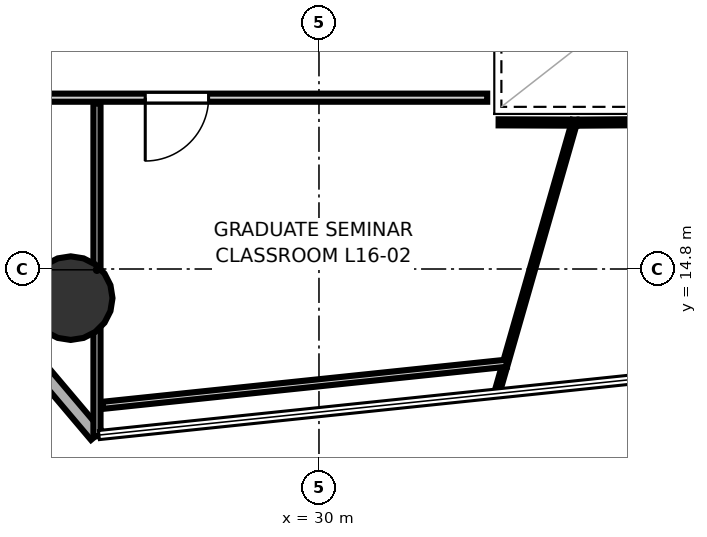
"""IFC4 building model, lengths in metres.
Left out: names, types, materials, properties, quantities, classifications, styles, units other than length and angle.
Written with IfcOpenShell. Run it as: python <this file> out.ifc"""

import sys

from ifc_helpers import new_model, si_unit, direction, frame, frame_2d, origin, origin_2d, place, context, subcontext, project, spatial, rectangle, hollow_circle, extrude, element, fill, save


model = new_model("IFC4")
c1 = context("Model", 3, precision=1e-05, world=origin(), true_north=direction((0.0, 1.0)))
c2 = subcontext(c1, "Body", "Model", "MODEL_VIEW")
j1 = project(units=[si_unit("LENGTHUNIT", "METRE"), si_unit("PLANEANGLEUNIT", "RADIAN")], contexts=[c1])
p1 = place(None, origin())
s1 = spatial("IfcSite", under=j1, at=p1, CompositionType="ELEMENT")
p2 = place(p1, origin())
s2 = spatial("IfcBuilding", under=s1, at=p2, CompositionType="ELEMENT")
p3 = place(p2, frame((0.0, 0.0, 67.3)))
s3 = spatial("IfcBuildingStorey", under=s2, at=p3, CompositionType="ELEMENT", Elevation=67.3)
p4 = place(p3, frame((25.1, 14.225, 0.0), z_axis=(0.0, 0.0, 1.0), x_axis=(1.0, 0.0, 0.0)))
e1 = element("IfcColumn", 1, at=p4, inside=s3, PredefinedType="COLUMN", context=c2, shape_type="SweptSolid", body=[
    extrude(hollow_circle(Radius=0.825, WallThickness=0.04, at=origin_2d()), origin(), (0.0, 0.0, 1.0), 3.7),
])
p5 = place(p3, frame((17.827, 20.72, 0.0), z_axis=(0.0, 0.0, 1.0), x_axis=(0.645636137958, -0.763645190755, 0.0)))
e2 = element("IfcWall", 2, at=p5, inside=s3, PredefinedType="SOLIDWALL", context=c2, shape_type="SweptSolid", body=[
    extrude(rectangle(XDim=12.051, YDim=0.28, at=frame_2d((6.025, 0.0))), origin(), (0.0, 0.0, 1.0), 3.52),
])
p6 = place(p5, frame((2.715, 0.0, 0.85)))
e3 = element("IfcOpeningElement", 3, at=p6, cuts=e2, PredefinedType="OPENING", context=c2, shape_type="SweptSolid", body=[
    extrude(rectangle(XDim=1.8, YDim=2.1, at=frame_2d((0.9, 1.05))), frame((0.0, 0.15, 0.0), z_axis=(0.0, -1.0, 0.0), x_axis=(1.0, 0.0, 0.0)), (0.0, 0.0, 1.0), 0.3),
])
p7 = place(p5, frame((7.536, 0.0, 0.85)))
e4 = element("IfcOpeningElement", 4, at=p7, cuts=e2, PredefinedType="OPENING", context=c2, shape_type="SweptSolid", body=[
    extrude(rectangle(XDim=1.8, YDim=2.1, at=frame_2d((0.9, 1.05))), frame((0.0, 0.15, 0.0), z_axis=(0.0, -1.0, 0.0), x_axis=(1.0, 0.0, 0.0)), (0.0, 0.0, 1.0), 0.3),
])
p8 = place(p3, frame((33.32, 18.181, 0.0), z_axis=(0.0, 0.0, 1.0), x_axis=(-1.0, 0.0, 0.0)))
e5 = element("IfcWall", 5, at=p8, inside=s3, PredefinedType="PARTITIONING", context=c2, shape_type="SweptSolid", body=[
    extrude(rectangle(XDim=9.77, YDim=0.16, at=frame_2d((4.885, 0.0))), origin(), (0.0, 0.0, 1.0), 2.798),
])
p9 = place(p8, frame((5.499, 0.0, 0.0)))
e6 = element("IfcOpeningElement", 6, at=p9, cuts=e5, PredefinedType="OPENING", context=c2, shape_type="SweptSolid", body=[
    extrude(rectangle(XDim=1.25, YDim=2.2, at=frame_2d((0.625, 1.1))), frame((0.0, 0.09, 0.0), z_axis=(0.0, -1.0, 0.0), x_axis=(1.0, 0.0, 0.0)), (0.0, 0.0, 1.0), 0.18),
])
p10 = place(p3, frame((25.619, 18.07, 0.0), z_axis=(0.0, 0.0, 1.0), x_axis=(0.0, -1.0, 0.0)))
e7 = element("IfcWall", 7, at=p10, inside=s3, PredefinedType="PARTITIONING", context=c2, shape_type="SweptSolid", body=[
    extrude(rectangle(XDim=6.571, YDim=0.14, at=frame_2d((3.286, 0.0))), origin(), (0.0, 0.0, 1.0), 2.798),
])
p11 = place(p3, frame((33.545, 17.694, 0.0), z_axis=(0.0, 0.0, 1.0), x_axis=(0.99999388923, -0.003495926516, 0.0)))
e8 = element("IfcWall", 8, at=p11, inside=s3, PredefinedType="PARTITIONING", context=c2, shape_type="SweptSolid", body=[
    extrude(rectangle(XDim=1.536, YDim=0.12, at=frame_2d((0.768, 0.0))), origin(), (0.0, 0.0, 1.0), 2.84),
])
p12 = place(p3, frame((35.052, 17.729, 0.0), z_axis=(0.0, 0.0, 1.0), x_axis=(-0.275649797441, -0.961258128273, 0.0)))
e9 = element("IfcWall", 9, at=p12, inside=s3, PredefinedType="PARTITIONING", context=c2, shape_type="SweptSolid", body=[
    extrude(rectangle(XDim=5.624, YDim=0.105, at=frame_2d((2.812, 0.0))), origin(), (0.0, 0.0, 1.0), 2.798),
])
p13 = place(p3, frame((33.699, 12.941, 0.0), z_axis=(0.0, 0.0, 1.0), x_axis=(-0.994606169047, -0.103723519483, 0.0)))
e10 = element("IfcWall", 10, at=p13, inside=s3, PredefinedType="PARTITIONING", context=c2, shape_type="SweptSolid", body=[
    extrude(rectangle(XDim=8.012, YDim=0.14, at=frame_2d((4.006, 0.0))), origin(), (0.0, 0.0, 1.0), 2.84),
])
p14 = place(p3, frame((35.144, 17.689, 0.0), z_axis=(0.0, 0.0, 1.0), x_axis=(0.99997784373, 0.00665672965, 0.0)))
e11 = element("IfcWall", 11, at=p14, inside=s3, PredefinedType="PARTITIONING", context=c2, shape_type="SweptSolid", body=[
    extrude(rectangle(XDim=4.988, YDim=0.12, at=frame_2d((2.494, 0.0))), origin(), (0.0, 0.0, 1.0), 2.84),
])
p15 = place(p9, origin())
e12 = element("IfcDoor", 12, at=p15, inside=s3, OperationType="SINGLE_SWING_RIGHT", PredefinedType="DOOR", context=c2, shape_type="SweptSolid", body=[
    extrude(rectangle(XDim=1.25, YDim=2.2, at=frame_2d((0.625, 1.1))), frame((0.0, 0.025, 0.0), z_axis=(0.0, -1.0, 0.0), x_axis=(1.0, 0.0, 0.0)), (0.0, 0.0, 1.0), 0.05),
])
fill(e6, e12)
save(model, sys.argv[1])
